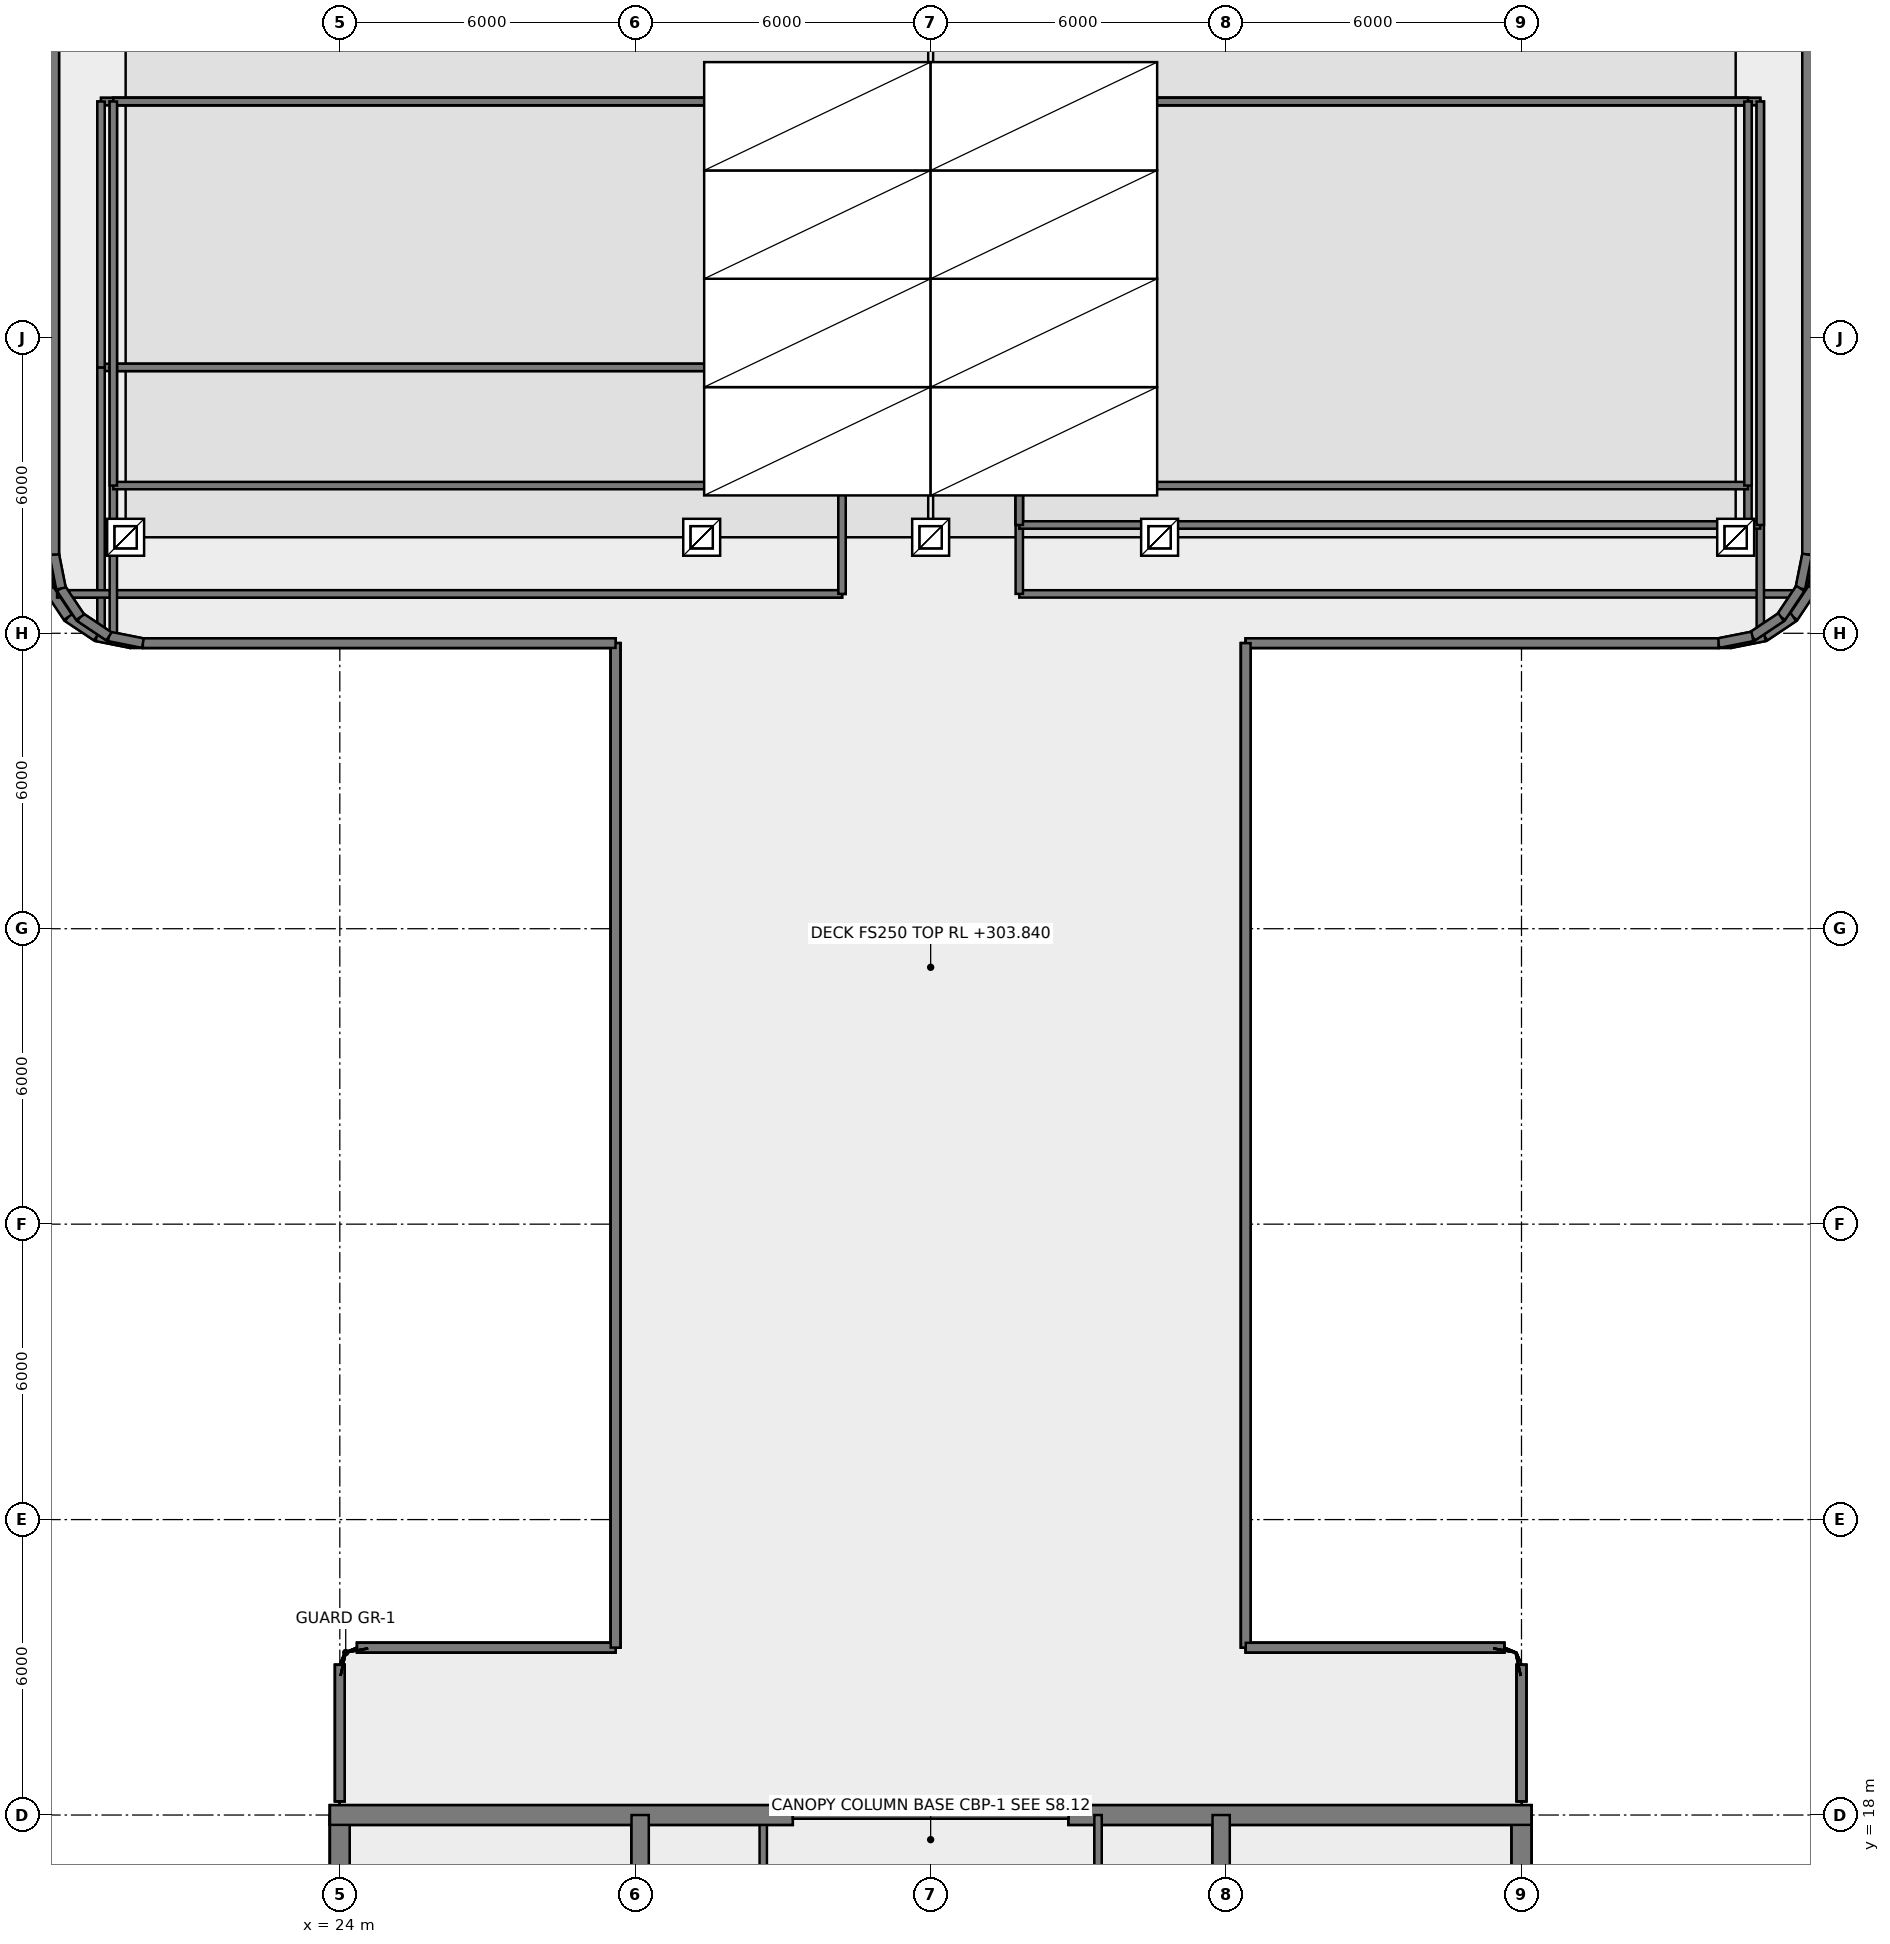
"""IFC4 building model, lengths in metres.
Left out: names, types, materials, properties, quantities, classifications, styles, units other than length and angle.
Written with IfcOpenShell. Run it as: python <this file> out.ifc"""

import sys

from ifc_helpers import new_model, si_unit, direction, frame, frame_2d, origin, origin_2d, place, context, subcontext, project, spatial, rectangle, hollow_rectangle, extrude, source, transform, mapped, element, fill, save


model = new_model("IFC4")
c1 = context("Model", 3, precision=1e-05, world=origin(), true_north=direction((0.0, 1.0)))
c2 = subcontext(c1, "Body", "Model", "MODEL_VIEW")
j1 = project(units=[si_unit("LENGTHUNIT", "METRE"), si_unit("PLANEANGLEUNIT", "RADIAN")], contexts=[c1])
p1 = place(None, origin())
s1 = spatial("IfcSite", under=j1, at=p1, CompositionType="ELEMENT")
p2 = place(p1, origin())
s2 = spatial("IfcBuilding", under=s1, at=p2, CompositionType="ELEMENT")
p3 = place(p2, frame((0.0, 0.0, 303.84)))
s3 = spatial("IfcBuildingStorey", under=s2, at=p3, CompositionType="ELEMENT", Elevation=303.84)
m1 = source(origin(), c2, "Body", "SweptSolid", [
    extrude(rectangle(XDim=0.6, YDim=0.6, at=origin_2d()), origin(), (0.0, 0.0, 1.0), 3.96),
])
for number, where, z_axis, x_axis in (
    (1, (24.0, 18.0, 0.0), (0.0, 0.0, 1.0), (1.0, 0.0, 0.0)),
    (2, (30.0, 18.0, 0.0), (0.0, 0.0, 1.0), (1.0, 0.0, 0.0)),
    (3, (36.0, 18.0, 0.0), (0.0, 0.0, 1.0), (1.0, 0.0, 0.0)),
    (4, (42.0, 18.0, 0.0), (0.0, 0.0, 1.0), (1.0, 0.0, 0.0)),
    (5, (48.0, 18.0, 0.0), (0.0, 0.0, 1.0), (1.0, 0.0, 0.0)),
):
    element("IfcColumn", number, at=place(p3, frame(where, z_axis=z_axis, x_axis=x_axis)), inside=s3, PredefinedType="COLUMN", context=c2, shape_type="MappedRepresentation", body=[
        mapped(m1, transform((0.0, 0.0, 0.0), x_axis=(1.0, 0.0, 0.0), y_axis=(0.0, 1.0, 0.0), z_axis=(0.0, 0.0, 1.0), scale=1.0)),
    ])
for number, where, z_axis, x_axis in (
    (6, (24.0, 6.0, 0.0), (0.0, 0.0, 1.0), (0.0, 1.0, 0.0)),
    (7, (48.0, 18.0, 0.0), (0.0, 0.0, 1.0), (0.0, -1.0, 0.0)),
):
    element("IfcWall", number, at=place(p3, frame(where, z_axis=z_axis, x_axis=x_axis)), inside=s3, PredefinedType="SHEAR", context=c2, shape_type="SweptSolid", body=[
        extrude(rectangle(XDim=12.0, YDim=0.4, at=frame_2d((6.0, 0.0))), origin(), (0.0, 0.0, 1.0), 3.96),
    ])
p4 = place(p3, frame((23.8, 18.0, 0.0), z_axis=(0.0, 0.0, 1.0), x_axis=(1.0, 0.0, 0.0)))
e8 = element("IfcWall", 8, at=p4, inside=s3, PredefinedType="SHEAR", context=c2, shape_type="SweptSolid", body=[
    extrude(rectangle(XDim=9.4, YDim=0.4, at=frame_2d((4.7, 0.0))), origin(), (0.0, 0.0, 1.0), 3.96),
])
p5 = place(p4, frame((2.95, 0.0, 0.0)))
e9 = element("IfcOpeningElement", 9, at=p5, cuts=e8, PredefinedType="OPENING", context=c2, shape_type="SweptSolid", body=[
    extrude(rectangle(XDim=1.1, YDim=2.1, at=origin_2d()), frame((0.55, 0.21, 1.05), z_axis=(0.0, -1.0, 0.0), x_axis=(1.0, 0.0, 0.0)), (0.0, 0.0, 1.0), 0.42),
])
p6 = place(p3, frame((38.8, 18.0, 0.0), z_axis=(0.0, 0.0, 1.0), x_axis=(1.0, 0.0, 0.0)))
e10 = element("IfcWall", 10, at=p6, inside=s3, PredefinedType="SHEAR", context=c2, shape_type="SweptSolid", body=[
    extrude(rectangle(XDim=9.4, YDim=0.4, at=frame_2d((4.7, 0.0))), origin(), (0.0, 0.0, 1.0), 3.96),
])
p7 = place(p6, frame((5.45, 0.0, 0.0)))
e11 = element("IfcOpeningElement", 11, at=p7, cuts=e10, PredefinedType="OPENING", context=c2, shape_type="SweptSolid", body=[
    extrude(rectangle(XDim=1.1, YDim=2.1, at=origin_2d()), frame((0.55, 0.21, 1.05), z_axis=(0.0, -1.0, 0.0), x_axis=(1.0, 0.0, 0.0)), (0.0, 0.0, 1.0), 0.42),
])
for number, where, z_axis, x_axis in (
    (12, (30.1, 6.0, 0.0), (0.0, 0.0, 1.0), (0.0, 1.0, 0.0)),
    (13, (41.9, 18.0, 0.0), (0.0, 0.0, 1.0), (0.0, -1.0, 0.0)),
):
    element("IfcWall", number, at=place(p3, frame(where, z_axis=z_axis, x_axis=x_axis)), inside=s3, PredefinedType="SHEAR", context=c2, shape_type="SweptSolid", body=[
        extrude(rectangle(XDim=12.0, YDim=0.35, at=frame_2d((6.0, 0.0))), origin(), (0.0, 0.0, 1.0), 3.96),
    ])
m2 = source(origin(), c2, "Body", "SweptSolid", [
    extrude(hollow_rectangle(XDim=0.4, YDim=0.4, WallThickness=0.02, OuterFilletRadius=0.04, at=origin_2d()), origin(), (0.0, 0.0, 1.0), 3.96),
])
for number, where, z_axis, x_axis in (
    (14, (19.65, 43.95, 0.0), (0.0, 0.0, 1.0), (1.0, 0.0, 0.0)),
    (15, (52.35, 43.95, 0.0), (0.0, 0.0, 1.0), (1.0, 0.0, 0.0)),
    (16, (31.35, 43.95, 0.0), (0.0, 0.0, 1.0), (1.0, 0.0, 0.0)),
    (17, (40.65, 43.95, 0.0), (0.0, 0.0, 1.0), (1.0, 0.0, 0.0)),
):
    element("IfcColumn", number, at=place(p3, frame(where, z_axis=z_axis, x_axis=x_axis)), inside=s3, PredefinedType="COLUMN", context=c2, shape_type="MappedRepresentation", body=[
        mapped(m2, transform((0.0, 0.0, 0.0), x_axis=(1.0, 0.0, 0.0), y_axis=(0.0, 1.0, 0.0), z_axis=(0.0, 0.0, 1.0), scale=1.0)),
    ])
for number, where, z_axis, x_axis in (
    (18, (48.0, 21.05, 0.0), (0.0, 0.0, 1.0), (0.0, -1.0, 0.0)),
    (19, (24.0, 18.28, 0.0), (0.0, 0.0, 1.0), (0.0, 1.0, 0.0)),
):
    element("IfcWall", number, at=place(p3, frame(where, z_axis=z_axis, x_axis=x_axis)), inside=s3, PredefinedType="SOLIDWALL", context=c2, shape_type="SweptSolid", body=[
        extrude(rectangle(XDim=2.77, YDim=0.195, at=frame_2d((1.385, 0.0))), origin(), (0.0, 0.0, 1.0), 2.898),
    ])
p8 = place(p3, frame((24.35, 21.4, 0.0), z_axis=(0.0, 0.0, 1.0), x_axis=(1.0, 0.0, 0.0)))
e20 = element("IfcWall", 20, at=p8, inside=s3, PredefinedType="SOLIDWALL", context=c2, shape_type="SweptSolid", body=[
    extrude(rectangle(XDim=5.25, YDim=0.195, at=frame_2d((2.625, 0.0))), origin(), (0.0, 0.0, 1.0), 3.71),
])
p9 = place(p3, frame((29.6, 21.4, 0.0), z_axis=(0.0, 0.0, 1.0), x_axis=(0.0, 1.0, 0.0)))
e21 = element("IfcWall", 21, at=p9, inside=s3, PredefinedType="SOLIDWALL", context=c2, shape_type="SweptSolid", body=[
    extrude(rectangle(XDim=20.4, YDim=0.195, at=frame_2d((10.2, 0.0))), origin(), (0.0, 0.0, 1.0), 2.998),
])
p10 = place(p3, frame((29.6, 41.8, 0.0), z_axis=(0.0, 0.0, 1.0), x_axis=(-1.0, 0.0, 0.0)))
e22 = element("IfcWall", 22, at=p10, inside=s3, PredefinedType="SOLIDWALL", context=c2, shape_type="SweptSolid", body=[
    extrude(rectangle(XDim=9.85, YDim=0.195, at=frame_2d((4.925, 0.0))), origin(), (0.0, 0.0, 1.0), 3.71),
])
p11 = place(p3, frame((19.75, 41.8, 0.0), z_axis=(0.0, 0.0, 1.0), x_axis=(-0.980794046625, 0.195046246068, 0.0)))
e23 = element("IfcWall", 23, at=p11, inside=s3, PredefinedType="SOLIDWALL", context=c2, shape_type="SweptSolid", body=[
    extrude(rectangle(XDim=0.702, YDim=0.195, at=frame_2d((0.351, 0.0))), origin(), (0.0, 0.0, 1.0), 3.71),
])
for number, where, z_axis, x_axis in (
    (24, (19.061, 41.937, 0.0), (0.0, 0.0, 1.0), (-0.832, 0.556, 0.0)),
    (25, (18.477, 42.327, 0.0), (0.0, 0.0, 1.0), (-0.556, 0.831, 0.0)),
    (26, (18.087, 42.911, 0.0), (0.0, 0.0, 1.0), (-0.195, 0.981, 0.0)),
    (27, (54.05, 43.6, 0.0), (0.0, 0.0, 1.0), (-0.195, -0.981, 0.0)),
    (28, (53.913, 42.911, 0.0), (0.0, 0.0, 1.0), (-0.556, -0.831, 0.0)),
    (29, (53.523, 42.327, 0.0), (0.0, 0.0, 1.0), (-0.832, -0.556, 0.0)),
):
    element("IfcWall", number, at=place(p3, frame(where, z_axis=z_axis, x_axis=x_axis)), inside=s3, PredefinedType="SOLIDWALL", context=c2, shape_type="SweptSolid", body=[
        extrude(rectangle(XDim=0.702, YDim=0.195, at=frame_2d((0.351, 0.0))), origin(), (0.0, 0.0, 1.0), 3.71),
    ])
p12 = place(p3, frame((52.939, 41.937, 0.0), z_axis=(0.0, 0.0, 1.0), x_axis=(-0.980794046625, -0.195046246068, 0.0)))
e30 = element("IfcWall", 30, at=p12, inside=s3, PredefinedType="SOLIDWALL", context=c2, shape_type="SweptSolid", body=[
    extrude(rectangle(XDim=0.702, YDim=0.195, at=frame_2d((0.351, 0.0))), origin(), (0.0, 0.0, 1.0), 3.71),
])
p13 = place(p3, frame((52.25, 41.8, 0.0), z_axis=(0.0, 0.0, 1.0), x_axis=(-1.0, 0.0, 0.0)))
e31 = element("IfcWall", 31, at=p13, inside=s3, PredefinedType="SOLIDWALL", context=c2, shape_type="SweptSolid", body=[
    extrude(rectangle(XDim=9.85, YDim=0.195, at=frame_2d((4.925, 0.0))), origin(), (0.0, 0.0, 1.0), 3.71),
])
p14 = place(p3, frame((42.4, 41.8, 0.0), z_axis=(0.0, 0.0, 1.0), x_axis=(0.0, -1.0, 0.0)))
e32 = element("IfcWall", 32, at=p14, inside=s3, PredefinedType="SOLIDWALL", context=c2, shape_type="SweptSolid", body=[
    extrude(rectangle(XDim=20.4, YDim=0.195, at=frame_2d((10.2, 0.0))), origin(), (0.0, 0.0, 1.0), 2.998),
])
p15 = place(p3, frame((42.4, 21.4, 0.0), z_axis=(0.0, 0.0, 1.0), x_axis=(1.0, 0.0, 0.0)))
e33 = element("IfcWall", 33, at=p15, inside=s3, PredefinedType="SOLIDWALL", context=c2, shape_type="SweptSolid", body=[
    extrude(rectangle(XDim=5.25, YDim=0.195, at=frame_2d((2.625, 0.0))), origin(), (0.0, 0.0, 1.0), 3.71),
])
p16 = place(p3, frame((39.4, 11.0, 0.0), z_axis=(0.0, 0.0, 1.0), x_axis=(0.0, 1.0, 0.0)))
e34 = element("IfcWall", 34, at=p16, inside=s3, PredefinedType="PARTITIONING", context=c2, shape_type="SweptSolid", body=[
    extrude(rectangle(XDim=7.0, YDim=0.15, at=frame_2d((3.5, 0.0))), origin(), (0.0, 0.0, 1.0), 3.68),
])
p17 = place(p16, frame((2.4, 0.0, 0.0)))
e35 = element("IfcOpeningElement", 35, at=p17, cuts=e34, PredefinedType="OPENING", context=c2, shape_type="SweptSolid", body=[
    extrude(rectangle(XDim=1.1, YDim=2.1, at=origin_2d()), frame((0.55, 0.085, 1.05), z_axis=(0.0, -1.0, 0.0), x_axis=(1.0, 0.0, 0.0)), (0.0, 0.0, 1.0), 0.17),
])
p18 = place(p3, frame((33.2, 18.0, 0.0), z_axis=(0.0, 0.0, 1.0), x_axis=(1.0, 0.0, 0.0)))
e36 = element("IfcWall", 36, at=p18, inside=s3, PredefinedType="PARTITIONING", context=c2, shape_type="SweptSolid", body=[
    extrude(rectangle(XDim=5.6, YDim=0.15, at=frame_2d((2.8, 0.0))), origin(), (0.0, 0.0, 1.0), 2.695),
])
p19 = place(p18, frame((0.19, 0.0, 0.0)))
e37 = element("IfcOpeningElement", 37, at=p19, cuts=e36, PredefinedType="OPENING", context=c2, shape_type="SweptSolid", body=[
    extrude(rectangle(XDim=1.1, YDim=2.1, at=origin_2d()), frame((0.55, 0.085, 1.05), z_axis=(0.0, -1.0, 0.0), x_axis=(1.0, 0.0, 0.0)), (0.0, 0.0, 1.0), 0.17),
])
p20 = place(p18, frame((4.31, 0.0, 0.0)))
e38 = element("IfcOpeningElement", 38, at=p20, cuts=e36, PredefinedType="OPENING", context=c2, shape_type="SweptSolid", body=[
    extrude(rectangle(XDim=1.1, YDim=2.1, at=origin_2d()), frame((0.55, 0.085, 1.05), z_axis=(0.0, -1.0, 0.0), x_axis=(1.0, 0.0, 0.0)), (0.0, 0.0, 1.0), 0.17),
])
for number, where, z_axis, x_axis in (
    (39, (18.258, 42.8, 0.0), (0.0, 0.0, 1.0), (1.0, 0.0, 0.0)),
    (40, (37.8, 42.8, 0.0), (0.0, 0.0, 1.0), (1.0, 0.0, 0.0)),
):
    element("IfcWall", number, at=place(p3, frame(where, z_axis=z_axis, x_axis=x_axis)), inside=s3, PredefinedType="PARTITIONING", context=c2, shape_type="SweptSolid", body=[
        extrude(rectangle(XDim=15.942, YDim=0.15, at=frame_2d((7.971, 0.0))), origin(), (0.0, 0.0, 1.0), 3.68),
    ])
for number, where, z_axis, x_axis in (
    (41, (19.15, 52.8, 0.0), (0.0, 0.0, 1.0), (1.0, 0.0, 0.0)),
    (42, (37.8, 52.8, 0.0), (0.0, 0.0, 1.0), (1.0, 0.0, 0.0)),
):
    element("IfcWall", number, at=place(p3, frame(where, z_axis=z_axis, x_axis=x_axis)), inside=s3, PredefinedType="PARTITIONING", context=c2, shape_type="SweptSolid", body=[
        extrude(rectangle(XDim=15.05, YDim=0.15, at=frame_2d((7.525, 0.0))), origin(), (0.0, 0.0, 1.0), 3.162),
    ])
p21 = place(p3, frame((19.15, 42.001, 0.0), z_axis=(0.0, 0.0, 1.0), x_axis=(0.0, 1.0, 0.0)))
e43 = element("IfcWall", 43, at=p21, inside=s3, PredefinedType="PARTITIONING", context=c2, shape_type="SweptSolid", body=[
    extrude(rectangle(XDim=10.799, YDim=0.15, at=frame_2d((5.399, 0.0))), origin(), (0.0, 0.0, 1.0), 3.68),
])
p22 = place(p3, frame((34.2, 42.8, 0.0), z_axis=(0.0, 0.0, 1.0), x_axis=(0.0, 1.0, 0.0)))
e44 = element("IfcWall", 44, at=p22, inside=s3, PredefinedType="PARTITIONING", context=c2, shape_type="SweptSolid", body=[
    extrude(rectangle(XDim=10.0, YDim=0.15, at=frame_2d((5.0, 0.0))), origin(), (0.0, 0.0, 1.0), 3.68),
])
p23 = place(p22, frame((4.45, 0.0, 0.0)))
e45 = element("IfcOpeningElement", 45, at=p23, cuts=e44, PredefinedType="OPENING", context=c2, shape_type="SweptSolid", body=[
    extrude(rectangle(XDim=1.1, YDim=2.1, at=origin_2d()), frame((0.55, 0.085, 1.05), z_axis=(0.0, -1.0, 0.0), x_axis=(1.0, 0.0, 0.0)), (0.0, 0.0, 1.0), 0.17),
])
p24 = place(p3, frame((37.8, 42.8, 0.0), z_axis=(0.0, 0.0, 1.0), x_axis=(0.0, 1.0, 0.0)))
e46 = element("IfcWall", 46, at=p24, inside=s3, PredefinedType="PARTITIONING", context=c2, shape_type="SweptSolid", body=[
    extrude(rectangle(XDim=10.0, YDim=0.15, at=frame_2d((5.0, 0.0))), origin(), (0.0, 0.0, 1.0), 3.68),
])
p25 = place(p24, frame((4.45, 0.0, 0.0)))
e47 = element("IfcOpeningElement", 47, at=p25, cuts=e46, PredefinedType="OPENING", context=c2, shape_type="SweptSolid", body=[
    extrude(rectangle(XDim=1.1, YDim=2.1, at=origin_2d()), frame((0.55, 0.085, 1.05), z_axis=(0.0, -1.0, 0.0), x_axis=(1.0, 0.0, 0.0)), (0.0, 0.0, 1.0), 0.17),
])
p26 = place(p3, frame((52.85, 42.001, 0.0), z_axis=(0.0, 0.0, 1.0), x_axis=(0.0, 1.0, 0.0)))
e48 = element("IfcWall", 48, at=p26, inside=s3, PredefinedType="PARTITIONING", context=c2, shape_type="SweptSolid", body=[
    extrude(rectangle(XDim=10.799, YDim=0.15, at=frame_2d((5.399, 0.0))), origin(), (0.0, 0.0, 1.0), 3.68),
])
m3 = source(origin(), c2, "Body", "SweptSolid", [
    extrude(rectangle(XDim=1.1, YDim=2.1, at=origin_2d()), frame((0.55, 0.025, 1.05), z_axis=(0.0, -1.0, 0.0), x_axis=(1.0, 0.0, 0.0)), (0.0, 0.0, 1.0), 0.05),
])
p27 = place(p19, origin())
e49 = element("IfcDoor", 49, at=p27, inside=s3, OperationType="SINGLE_SWING_LEFT", PredefinedType="DOOR", context=c2, shape_type="MappedRepresentation", body=[
    mapped(m3, transform((0.0, 0.0, 0.0), x_axis=(1.0, 0.0, 0.0), y_axis=(0.0, 1.0, 0.0), z_axis=(0.0, 0.0, 1.0), scale=1.0)),
])
fill(e37, e49)
p28 = place(p20, origin())
e50 = element("IfcDoor", 50, at=p28, inside=s3, OperationType="SINGLE_SWING_RIGHT", PredefinedType="DOOR", context=c2, shape_type="MappedRepresentation", body=[
    mapped(m3, transform((0.0, 0.0, 0.0), x_axis=(1.0, 0.0, 0.0), y_axis=(0.0, 1.0, 0.0), z_axis=(0.0, 0.0, 1.0), scale=1.0)),
])
fill(e38, e50)
p29 = place(p5, origin())
e51 = element("IfcDoor", 51, at=p29, inside=s3, OperationType="SINGLE_SWING_LEFT", PredefinedType="DOOR", context=c2, shape_type="MappedRepresentation", body=[
    mapped(m3, transform((0.0, 0.0, 0.0), x_axis=(1.0, 0.0, 0.0), y_axis=(0.0, 1.0, 0.0), z_axis=(0.0, 0.0, 1.0), scale=1.0)),
])
fill(e9, e51)
p30 = place(p7, origin())
e52 = element("IfcDoor", 52, at=p30, inside=s3, OperationType="SINGLE_SWING_RIGHT", PredefinedType="DOOR", context=c2, shape_type="MappedRepresentation", body=[
    mapped(m3, transform((0.0, 0.0, 0.0), x_axis=(1.0, 0.0, 0.0), y_axis=(0.0, 1.0, 0.0), z_axis=(0.0, 0.0, 1.0), scale=1.0)),
])
fill(e11, e52)
m4 = source(origin(), c2, "Body", "SweptSolid", [
    extrude(rectangle(XDim=1.1, YDim=2.1, at=origin_2d()), frame((0.55, 0.025, 1.05), z_axis=(0.0, -1.0, 0.0), x_axis=(1.0, 0.0, 0.0)), (0.0, 0.0, 1.0), 0.05),
])
p31 = place(p23, origin())
e53 = element("IfcDoor", 53, at=p31, inside=s3, OperationType="SINGLE_SWING_LEFT", PredefinedType="DOOR", context=c2, shape_type="MappedRepresentation", body=[
    mapped(m4, transform((0.0, 0.0, 0.0), x_axis=(1.0, 0.0, 0.0), y_axis=(0.0, 1.0, 0.0), z_axis=(0.0, 0.0, 1.0), scale=1.0)),
])
fill(e45, e53)
p32 = place(p25, origin())
e54 = element("IfcDoor", 54, at=p32, inside=s3, OperationType="SINGLE_SWING_LEFT", PredefinedType="DOOR", context=c2, shape_type="MappedRepresentation", body=[
    mapped(m4, transform((0.0, 0.0, 0.0), x_axis=(1.0, 0.0, 0.0), y_axis=(0.0, 1.0, 0.0), z_axis=(0.0, 0.0, 1.0), scale=1.0)),
])
fill(e47, e54)
save(model, sys.argv[1])
